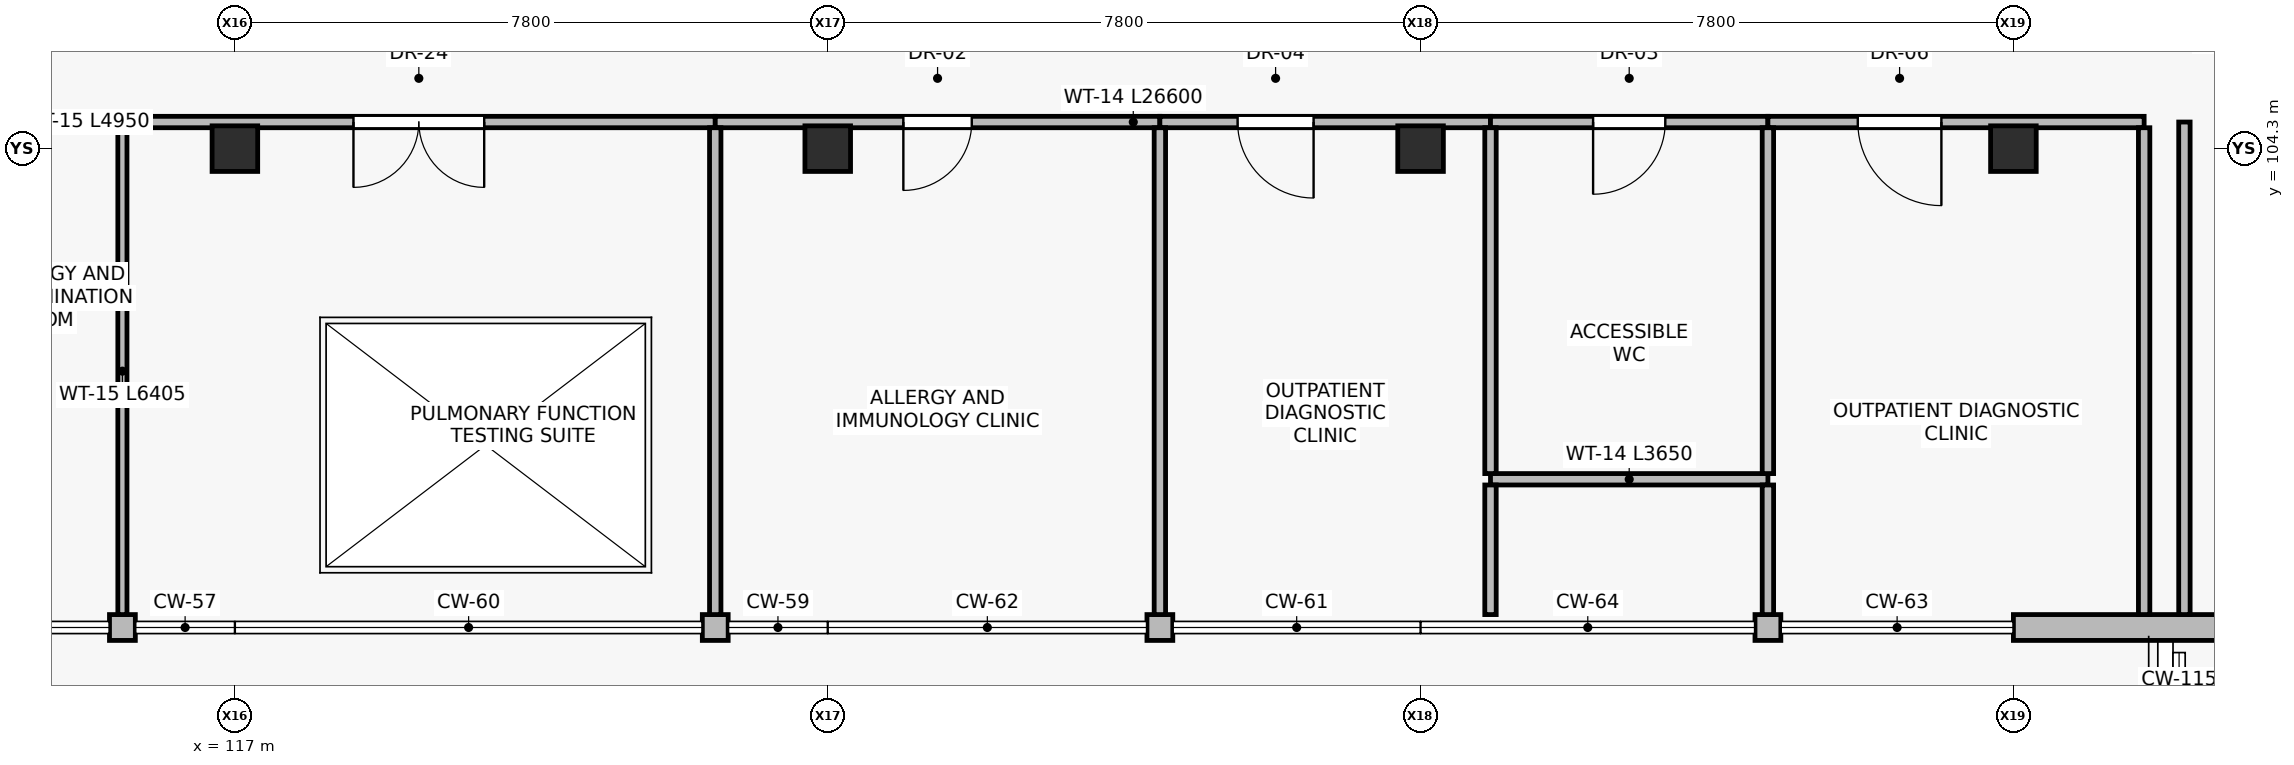
"""IFC4 building model, lengths in metres.
Left out: names, types, materials, properties, quantities, classifications, styles, units other than length and angle.
Written with IfcOpenShell. Run it as: python <this file> out.ifc"""

import sys

from ifc_helpers import new_model, si_unit, direction, frame, frame_2d, origin, origin_2d, place, context, subcontext, project, spatial, rectangle, extrude, element, fill, save


model = new_model("IFC4")
c1 = context("Model", 3, precision=1e-05, world=origin(), true_north=direction((0.0, 1.0)))
c2 = subcontext(c1, "Body", "Model", "MODEL_VIEW")
j1 = project(units=[si_unit("LENGTHUNIT", "METRE"), si_unit("PLANEANGLEUNIT", "RADIAN")], contexts=[c1])
p1 = place(None, origin())
s1 = spatial("IfcSite", under=j1, at=p1, CompositionType="ELEMENT")
p2 = place(p1, origin())
s2 = spatial("IfcBuilding", under=s1, at=p2, CompositionType="ELEMENT")
p3 = place(p2, frame((0.0, 0.0, 4.8)))
s3 = spatial("IfcBuildingStorey", under=s2, at=p3, CompositionType="ELEMENT", Elevation=4.8)
for number, where, z_axis, x_axis in (
    (1, (117.0, 104.3, 0.0), (0.0, 0.0, 1.0), (1.0, 0.0, 0.0)),
    (2, (124.8, 104.3, 0.0), (0.0, 0.0, 1.0), (1.0, 0.0, 0.0)),
    (3, (132.6, 104.3, 0.0), (0.0, 0.0, 1.0), (1.0, 0.0, 0.0)),
    (4, (140.4, 104.3, 0.0), (0.0, 0.0, 1.0), (1.0, 0.0, 0.0)),
):
    element("IfcColumn", number, at=place(p3, frame(where, z_axis=z_axis, x_axis=x_axis)), inside=s3, PredefinedType="COLUMN", context=c2, shape_type="SweptSolid", body=[
        extrude(rectangle(XDim=0.6, YDim=0.6, at=origin_2d()), origin(), (0.0, 0.0, 1.0), 4.8),
    ])
p4 = place(p3, frame((115.69, 98.0, 0.0), z_axis=(0.0, 0.0, 1.0), x_axis=(-1.0, 0.0, 0.0)))
e5 = element("IfcWall", 5, at=p4, inside=s3, PredefinedType="STANDARD", context=c2, shape_type="SweptSolid", body=[
    extrude(rectangle(XDim=0.34, YDim=0.34, at=frame_2d((0.17, 0.0))), origin(), (0.0, 0.0, 1.0), 4.54),
])
for number, where, z_axis, x_axis in (
    (6, (123.49, 98.0, 0.0), (0.0, 0.0, 1.0), (-1.0, 0.0, 0.0)),
    (7, (129.34, 98.0, 0.0), (0.0, 0.0, 1.0), (-1.0, 0.0, 0.0)),
    (8, (137.34, 98.0, 0.0), (0.0, 0.0, 1.0), (-1.0, 0.0, 0.0)),
):
    element("IfcWall", number, at=place(p3, frame(where, z_axis=z_axis, x_axis=x_axis)), inside=s3, PredefinedType="STANDARD", context=c2, shape_type="SweptSolid", body=[
        extrude(rectangle(XDim=0.34, YDim=0.34, at=frame_2d((0.17, 0.0))), origin(), (0.0, 0.0, 1.0), 4.54),
    ])
p5 = place(p3, frame((148.2, 98.0, 0.0), z_axis=(0.0, 0.0, 1.0), x_axis=(-1.0, 0.0, 0.0)))
e9 = element("IfcWall", 9, at=p5, inside=s3, PredefinedType="STANDARD", context=c2, shape_type="SweptSolid", body=[
    extrude(rectangle(XDim=7.8, YDim=0.34, at=frame_2d((3.9, 0.0))), origin(), (0.0, 0.0, 1.0), 4.54),
])
p6 = place(p5, frame((3.1, 0.0, 0.0)))
e10 = element("IfcOpeningElement", 10, at=p6, cuts=e9, PredefinedType="OPENING", context=c2, shape_type="SweptSolid", body=[
    extrude(rectangle(XDim=1.6, YDim=2.2, at=frame_2d((0.8, 1.1))), frame((0.0, 0.18, 0.0), z_axis=(0.0, -1.0, 0.0), x_axis=(1.0, 0.0, 0.0)), (0.0, 0.0, 1.0), 0.36),
])
p7 = place(p3, frame((142.65, 98.17, 0.0), z_axis=(0.0, 0.0, 1.0), x_axis=(0.0, 1.0, 0.0)))
e11 = element("IfcWall", 11, at=p7, inside=s3, PredefinedType="PARTITIONING", context=c2, shape_type="SweptSolid", body=[
    extrude(rectangle(XDim=6.48, YDim=0.15, at=frame_2d((3.24, 0.0))), origin(), (0.0, 0.0, 1.0), 4.21),
])
p8 = place(p3, frame((115.52, 104.65, 0.0), z_axis=(0.0, 0.0, 1.0), x_axis=(-1.0, 0.0, 0.0)))
e12 = element("IfcWall", 12, at=p8, inside=s3, PredefinedType="PARTITIONING", context=c2, shape_type="SweptSolid", body=[
    extrude(rectangle(XDim=4.95, YDim=0.12, at=frame_2d((2.475, 0.0))), origin(), (0.0, 0.0, 1.0), 4.04),
])
p9 = place(p8, frame((1.735, 0.0, 0.0)))
e13 = element("IfcOpeningElement", 13, at=p9, cuts=e12, PredefinedType="OPENING", context=c2, shape_type="SweptSolid", body=[
    extrude(rectangle(XDim=1.48, YDim=2.25, at=frame_2d((0.74, 1.125))), frame((0.0, 0.07, 0.0), z_axis=(0.0, -1.0, 0.0), x_axis=(1.0, 0.0, 0.0)), (0.0, 0.0, 1.0), 0.14),
])
p10 = place(p3, frame((123.32, 104.65, 0.0), z_axis=(0.0, 0.0, 1.0), x_axis=(-1.0, 0.0, 0.0)))
e14 = element("IfcWall", 14, at=p10, inside=s3, PredefinedType="PARTITIONING", context=c2, shape_type="SweptSolid", body=[
    extrude(rectangle(XDim=7.8, YDim=0.15, at=frame_2d((3.9, 0.0))), origin(), (0.0, 0.0, 1.0), 4.04),
])
p11 = place(p10, frame((3.04, 0.0, 0.0)))
e15 = element("IfcOpeningElement", 15, at=p11, cuts=e14, PredefinedType="OPENING", context=c2, shape_type="SweptSolid", body=[
    extrude(rectangle(XDim=1.72, YDim=2.3, at=frame_2d((0.86, 1.15))), frame((0.0, 0.085, 0.0), z_axis=(0.0, -1.0, 0.0), x_axis=(1.0, 0.0, 0.0)), (0.0, 0.0, 1.0), 0.17),
])
p12 = place(p3, frame((129.17, 104.65, 0.0), z_axis=(0.0, 0.0, 1.0), x_axis=(-1.0, 0.0, 0.0)))
e16 = element("IfcWall", 16, at=p12, inside=s3, PredefinedType="PARTITIONING", context=c2, shape_type="SweptSolid", body=[
    extrude(rectangle(XDim=5.85, YDim=0.15, at=frame_2d((2.925, 0.0))), origin(), (0.0, 0.0, 1.0), 4.04),
])
p13 = place(p12, frame((2.475, 0.0, 0.0)))
e17 = element("IfcOpeningElement", 17, at=p13, cuts=e16, PredefinedType="OPENING", context=c2, shape_type="SweptSolid", body=[
    extrude(rectangle(XDim=0.9, YDim=2.1, at=frame_2d((0.45, 1.05))), frame((0.0, 0.085, 0.0), z_axis=(0.0, -1.0, 0.0), x_axis=(1.0, 0.0, 0.0)), (0.0, 0.0, 1.0), 0.17),
])
p14 = place(p3, frame((133.52, 104.65, 0.0), z_axis=(0.0, 0.0, 1.0), x_axis=(-1.0, 0.0, 0.0)))
e18 = element("IfcWall", 18, at=p14, inside=s3, PredefinedType="PARTITIONING", context=c2, shape_type="SweptSolid", body=[
    extrude(rectangle(XDim=4.35, YDim=0.15, at=frame_2d((2.175, 0.0))), origin(), (0.0, 0.0, 1.0), 4.04),
])
p15 = place(p14, frame((2.327, 0.0, 0.0)))
e19 = element("IfcOpeningElement", 19, at=p15, cuts=e18, PredefinedType="OPENING", context=c2, shape_type="SweptSolid", body=[
    extrude(rectangle(XDim=1.0, YDim=2.1, at=frame_2d((0.5, 1.05))), frame((0.0, 0.085, 0.0), z_axis=(0.0, -1.0, 0.0), x_axis=(1.0, 0.0, 0.0)), (0.0, 0.0, 1.0), 0.17),
])
p16 = place(p3, frame((137.17, 104.65, 0.0), z_axis=(0.0, 0.0, 1.0), x_axis=(-1.0, 0.0, 0.0)))
e20 = element("IfcWall", 20, at=p16, inside=s3, PredefinedType="PARTITIONING", context=c2, shape_type="SweptSolid", body=[
    extrude(rectangle(XDim=3.65, YDim=0.15, at=frame_2d((1.825, 0.0))), origin(), (0.0, 0.0, 1.0), 4.04),
])
p17 = place(p16, frame((1.35, 0.0, 0.0)))
e21 = element("IfcOpeningElement", 21, at=p17, cuts=e20, PredefinedType="OPENING", context=c2, shape_type="SweptSolid", body=[
    extrude(rectangle(XDim=0.95, YDim=2.1, at=frame_2d((0.475, 1.05))), frame((0.0, 0.085, 0.0), z_axis=(0.0, -1.0, 0.0), x_axis=(1.0, 0.0, 0.0)), (0.0, 0.0, 1.0), 0.17),
])
p18 = place(p3, frame((133.52, 99.95, 0.0), z_axis=(0.0, 0.0, 1.0), x_axis=(1.0, 0.0, 0.0)))
e22 = element("IfcWall", 22, at=p18, inside=s3, PredefinedType="PARTITIONING", context=c2, shape_type="SweptSolid", body=[
    extrude(rectangle(XDim=3.65, YDim=0.15, at=frame_2d((1.825, 0.0))), origin(), (0.0, 0.0, 1.0), 4.54),
])
p19 = place(p3, frame((142.12, 104.65, 0.0), z_axis=(0.0, 0.0, 1.0), x_axis=(-1.0, 0.0, 0.0)))
e23 = element("IfcWall", 23, at=p19, inside=s3, PredefinedType="PARTITIONING", context=c2, shape_type="SweptSolid", body=[
    extrude(rectangle(XDim=4.95, YDim=0.15, at=frame_2d((2.475, 0.0))), origin(), (0.0, 0.0, 1.0), 4.04),
])
p20 = place(p19, frame((2.667, 0.0, 0.0)))
e24 = element("IfcOpeningElement", 24, at=p20, cuts=e23, PredefinedType="OPENING", context=c2, shape_type="SweptSolid", body=[
    extrude(rectangle(XDim=1.1, YDim=2.15, at=frame_2d((0.55, 1.075))), frame((0.0, 0.085, 0.0), z_axis=(0.0, -1.0, 0.0), x_axis=(1.0, 0.0, 0.0)), (0.0, 0.0, 1.0), 0.17),
])
p21 = place(p3, frame((115.52, 98.17, 0.0), z_axis=(0.0, 0.0, 1.0), x_axis=(0.0, 1.0, 0.0)))
e25 = element("IfcWall", 25, at=p21, inside=s3, PredefinedType="PARTITIONING", context=c2, shape_type="SweptSolid", body=[
    extrude(rectangle(XDim=6.405, YDim=0.12, at=frame_2d((3.203, 0.0))), origin(), (0.0, 0.0, 1.0), 4.54),
])
for number, where, z_axis, x_axis in (
    (26, (123.32, 98.17, 0.0), (0.0, 0.0, 1.0), (0.0, 1.0, 0.0)),
    (27, (129.17, 98.17, 0.0), (0.0, 0.0, 1.0), (0.0, 1.0, 0.0)),
):
    element("IfcWall", number, at=place(p3, frame(where, z_axis=z_axis, x_axis=x_axis)), inside=s3, PredefinedType="PARTITIONING", context=c2, shape_type="SweptSolid", body=[
        extrude(rectangle(XDim=6.405, YDim=0.15, at=frame_2d((3.203, 0.0))), origin(), (0.0, 0.0, 1.0), 4.54),
    ])
p22 = place(p3, frame((133.52, 98.17, 0.0), z_axis=(0.0, 0.0, 1.0), x_axis=(0.0, 1.0, 0.0)))
e28 = element("IfcWall", 28, at=p22, inside=s3, PredefinedType="PARTITIONING", context=c2, shape_type="SweptSolid", body=[
    extrude(rectangle(XDim=1.705, YDim=0.15, at=frame_2d((0.853, 0.0))), origin(), (0.0, 0.0, 1.0), 4.54),
])
for number, where, z_axis, x_axis in (
    (29, (133.52, 100.025, 0.0), (0.0, 0.0, 1.0), (0.0, 1.0, 0.0)),
    (30, (137.17, 100.025, 0.0), (0.0, 0.0, 1.0), (0.0, 1.0, 0.0)),
):
    element("IfcWall", number, at=place(p3, frame(where, z_axis=z_axis, x_axis=x_axis)), inside=s3, PredefinedType="PARTITIONING", context=c2, shape_type="SweptSolid", body=[
        extrude(rectangle(XDim=4.55, YDim=0.15, at=frame_2d((2.275, 0.0))), origin(), (0.0, 0.0, 1.0), 4.54),
    ])
p23 = place(p3, frame((137.17, 98.17, 0.0), z_axis=(0.0, 0.0, 1.0), x_axis=(0.0, 1.0, 0.0)))
e31 = element("IfcWall", 31, at=p23, inside=s3, PredefinedType="PARTITIONING", context=c2, shape_type="SweptSolid", body=[
    extrude(rectangle(XDim=1.705, YDim=0.15, at=frame_2d((0.853, 0.0))), origin(), (0.0, 0.0, 1.0), 4.54),
])
p24 = place(p3, frame((142.12, 98.17, 0.0), z_axis=(0.0, 0.0, 1.0), x_axis=(0.0, 1.0, 0.0)))
e32 = element("IfcWall", 32, at=p24, inside=s3, PredefinedType="PARTITIONING", context=c2, shape_type="SweptSolid", body=[
    extrude(rectangle(XDim=6.405, YDim=0.15, at=frame_2d((3.203, 0.0))), origin(), (0.0, 0.0, 1.0), 4.54),
])
p25 = place(p11, origin())
e33 = element("IfcDoor", 33, at=p25, inside=s3, OperationType="DOUBLE_DOOR_SINGLE_SWING", PredefinedType="DOOR", context=c2, shape_type="SweptSolid", body=[
    extrude(rectangle(XDim=1.72, YDim=2.3, at=frame_2d((0.86, 1.15))), frame((0.0, 0.025, 0.0), z_axis=(0.0, -1.0, 0.0), x_axis=(1.0, 0.0, 0.0)), (0.0, 0.0, 1.0), 0.05),
])
fill(e15, e33)
p26 = place(p13, origin())
e34 = element("IfcDoor", 34, at=p26, inside=s3, OperationType="SINGLE_SWING_RIGHT", PredefinedType="DOOR", context=c2, shape_type="SweptSolid", body=[
    extrude(rectangle(XDim=0.9, YDim=2.1, at=frame_2d((0.45, 1.05))), frame((0.0, 0.025, 0.0), z_axis=(0.0, -1.0, 0.0), x_axis=(1.0, 0.0, 0.0)), (0.0, 0.0, 1.0), 0.05),
])
fill(e17, e34)
p27 = place(p15, origin())
e35 = element("IfcDoor", 35, at=p27, inside=s3, OperationType="SINGLE_SWING_LEFT", PredefinedType="DOOR", context=c2, shape_type="SweptSolid", body=[
    extrude(rectangle(XDim=1.0, YDim=2.1, at=frame_2d((0.5, 1.05))), frame((0.0, 0.025, 0.0), z_axis=(0.0, -1.0, 0.0), x_axis=(1.0, 0.0, 0.0)), (0.0, 0.0, 1.0), 0.05),
])
fill(e19, e35)
p28 = place(p17, origin())
e36 = element("IfcDoor", 36, at=p28, inside=s3, OperationType="SINGLE_SWING_RIGHT", PredefinedType="DOOR", context=c2, shape_type="SweptSolid", body=[
    extrude(rectangle(XDim=0.95, YDim=2.1, at=frame_2d((0.475, 1.05))), frame((0.0, 0.025, 0.0), z_axis=(0.0, -1.0, 0.0), x_axis=(1.0, 0.0, 0.0)), (0.0, 0.0, 1.0), 0.05),
])
fill(e21, e36)
p29 = place(p20, origin())
e37 = element("IfcDoor", 37, at=p29, inside=s3, OperationType="SINGLE_SWING_LEFT", PredefinedType="DOOR", context=c2, shape_type="SweptSolid", body=[
    extrude(rectangle(XDim=1.1, YDim=2.15, at=frame_2d((0.55, 1.075))), frame((0.0, 0.025, 0.0), z_axis=(0.0, -1.0, 0.0), x_axis=(1.0, 0.0, 0.0)), (0.0, 0.0, 1.0), 0.05),
])
fill(e24, e37)
save(model, sys.argv[1])
